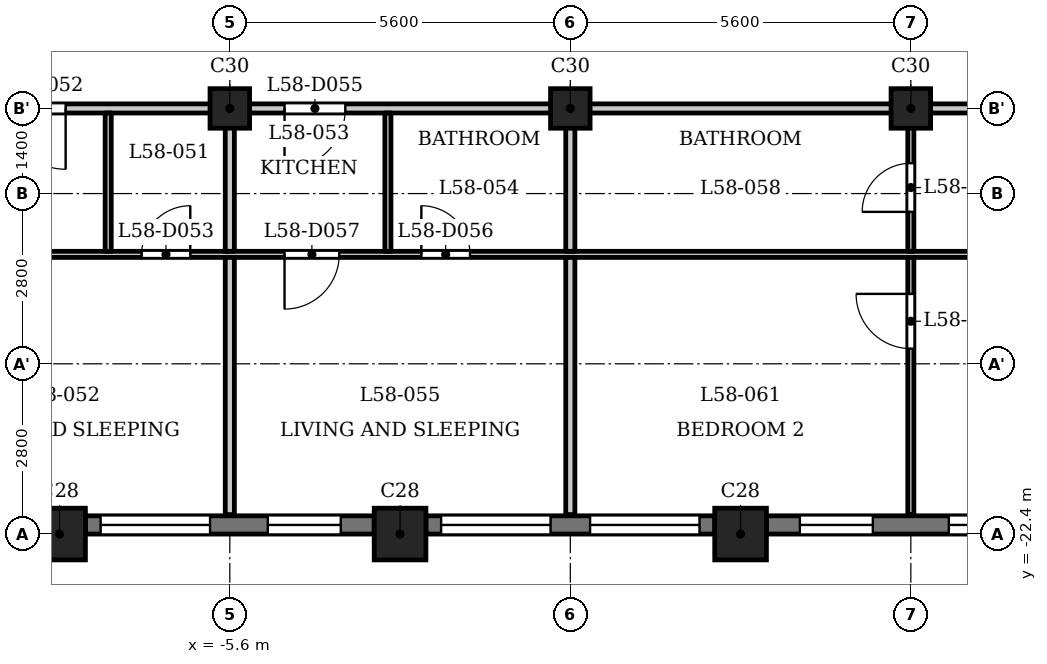
"""IFC4 building model, lengths in metres.
Left out: names, types, materials, properties, quantities, classifications, styles, units other than length and angle.
Written with IfcOpenShell. Run it as: python <this file> out.ifc"""

import sys

from ifc_helpers import new_model, si_unit, direction, frame, frame_2d, origin, origin_2d, place, context, subcontext, project, spatial, rectangle, extrude, element, fill, save


model = new_model("IFC4")
c1 = context("Model", 3, precision=1e-05, world=origin(), true_north=direction((0.0, 1.0)))
c2 = subcontext(c1, "Body", "Model", "MODEL_VIEW")
j1 = project(units=[si_unit("LENGTHUNIT", "METRE"), si_unit("PLANEANGLEUNIT", "RADIAN")], contexts=[c1])
p1 = place(None, origin())
s1 = spatial("IfcSite", under=j1, at=p1, CompositionType="ELEMENT")
p2 = place(p1, origin())
s2 = spatial("IfcBuilding", under=s1, at=p2, CompositionType="ELEMENT")
p3 = place(p2, frame((0.0, 0.0, 223.9)))
s3 = spatial("IfcBuildingStorey", under=s2, at=p3, CompositionType="ELEMENT", Elevation=223.9)
for number, where, z_axis, x_axis in (
    (1, (-8.4, -22.4, 0.0), (0.0, 0.0, 1.0), (1.0, 0.0, 0.0)),
    (2, (-2.8, -22.4, 0.0), (0.0, 0.0, 1.0), (1.0, 0.0, 0.0)),
    (3, (2.8, -22.4, 0.0), (0.0, 0.0, 1.0), (1.0, 0.0, 0.0)),
):
    element("IfcColumn", number, at=place(p3, frame(where, z_axis=z_axis, x_axis=x_axis)), inside=s3, PredefinedType="COLUMN", context=c2, shape_type="SweptSolid", body=[
        extrude(rectangle(XDim=0.85, YDim=0.85, at=origin_2d()), origin(), (0.0, 0.0, 1.0), 3.5),
    ])
for number, where, z_axis, x_axis in (
    (4, (-5.6, -15.4, 0.0), (0.0, 0.0, 1.0), (1.0, 0.0, 0.0)),
    (5, (0.0, -15.4, 0.0), (0.0, 0.0, 1.0), (1.0, 0.0, 0.0)),
    (6, (5.6, -15.4, 0.0), (0.0, 0.0, 1.0), (1.0, 0.0, 0.0)),
):
    element("IfcColumn", number, at=place(p3, frame(where, z_axis=z_axis, x_axis=x_axis)), inside=s3, PredefinedType="COLUMN", context=c2, shape_type="SweptSolid", body=[
        extrude(rectangle(XDim=0.65, YDim=0.65, at=origin_2d()), origin(), (0.0, 0.0, 1.0), 3.5),
    ])
p4 = place(p3, frame((-7.975, -22.25, 0.0), z_axis=(0.0, 0.0, 1.0), x_axis=(1.0, 0.0, 0.0)))
e7 = element("IfcWall", 7, at=p4, inside=s3, PredefinedType="SOLIDWALL", context=c2, shape_type="SweptSolid", body=[
    extrude(rectangle(XDim=4.75, YDim=0.3, at=frame_2d((2.375, 0.0))), origin(), (0.0, 0.0, 1.0), 2.5),
])
p5 = place(p4, frame((0.25, 0.0, 0.9)))
e8 = element("IfcOpeningElement", 8, at=p5, cuts=e7, PredefinedType="OPENING", context=c2, shape_type="SweptSolid", body=[
    extrude(rectangle(XDim=1.8, YDim=1.25, at=frame_2d((0.9, 0.625))), frame((0.0, 0.16, 0.0), z_axis=(0.0, -1.0, 0.0), x_axis=(1.0, 0.0, 0.0)), (0.0, 0.0, 1.0), 0.32),
])
p6 = place(p4, frame((3.0, 0.0, 0.6)))
e9 = element("IfcOpeningElement", 9, at=p6, cuts=e7, PredefinedType="OPENING", context=c2, shape_type="SweptSolid", body=[
    extrude(rectangle(XDim=1.2, YDim=1.55, at=frame_2d((0.6, 0.775))), frame((0.0, 0.16, 0.0), z_axis=(0.0, -1.0, 0.0), x_axis=(1.0, 0.0, 0.0)), (0.0, 0.0, 1.0), 0.32),
])
p7 = place(p3, frame((-2.375, -22.25, 0.0), z_axis=(0.0, 0.0, 1.0), x_axis=(1.0, 0.0, 0.0)))
e10 = element("IfcWall", 10, at=p7, inside=s3, PredefinedType="SOLIDWALL", context=c2, shape_type="SweptSolid", body=[
    extrude(rectangle(XDim=4.75, YDim=0.3, at=frame_2d((2.375, 0.0))), origin(), (0.0, 0.0, 1.0), 2.5),
])
p8 = place(p7, frame((0.25, 0.0, 0.9)))
e11 = element("IfcOpeningElement", 11, at=p8, cuts=e10, PredefinedType="OPENING", context=c2, shape_type="SweptSolid", body=[
    extrude(rectangle(XDim=1.8, YDim=1.25, at=frame_2d((0.9, 0.625))), frame((0.0, 0.16, 0.0), z_axis=(0.0, -1.0, 0.0), x_axis=(1.0, 0.0, 0.0)), (0.0, 0.0, 1.0), 0.32),
])
p9 = place(p7, frame((2.7, 0.0, 0.9)))
e12 = element("IfcOpeningElement", 12, at=p9, cuts=e10, PredefinedType="OPENING", context=c2, shape_type="SweptSolid", body=[
    extrude(rectangle(XDim=1.8, YDim=1.25, at=frame_2d((0.9, 0.625))), frame((0.0, 0.16, 0.0), z_axis=(0.0, -1.0, 0.0), x_axis=(1.0, 0.0, 0.0)), (0.0, 0.0, 1.0), 0.32),
])
p10 = place(p3, frame((3.225, -22.25, 0.0), z_axis=(0.0, 0.0, 1.0), x_axis=(1.0, 0.0, 0.0)))
e13 = element("IfcWall", 13, at=p10, inside=s3, PredefinedType="SOLIDWALL", context=c2, shape_type="SweptSolid", body=[
    extrude(rectangle(XDim=4.75, YDim=0.3, at=frame_2d((2.375, 0.0))), origin(), (0.0, 0.0, 1.0), 2.5),
])
p11 = place(p10, frame((0.55, 0.0, 0.6)))
e14 = element("IfcOpeningElement", 14, at=p11, cuts=e13, PredefinedType="OPENING", context=c2, shape_type="SweptSolid", body=[
    extrude(rectangle(XDim=1.2, YDim=1.55, at=frame_2d((0.6, 0.775))), frame((0.0, 0.16, 0.0), z_axis=(0.0, -1.0, 0.0), x_axis=(1.0, 0.0, 0.0)), (0.0, 0.0, 1.0), 0.32),
])
p12 = place(p10, frame((3.0, 0.0, 0.6)))
e15 = element("IfcOpeningElement", 15, at=p12, cuts=e13, PredefinedType="OPENING", context=c2, shape_type="SweptSolid", body=[
    extrude(rectangle(XDim=1.2, YDim=1.55, at=frame_2d((0.6, 0.775))), frame((0.0, 0.16, 0.0), z_axis=(0.0, -1.0, 0.0), x_axis=(1.0, 0.0, 0.0)), (0.0, 0.0, 1.0), 0.32),
])
p13 = place(p3, frame((-23.594, -17.8, 0.0), z_axis=(0.0, 0.0, 1.0), x_axis=(1.0, 0.0, 0.0)))
e16 = element("IfcWall", 16, at=p13, inside=s3, PredefinedType="PARTITIONING", context=c2, shape_type="SweptSolid", body=[
    extrude(rectangle(XDim=47.188, YDim=0.1, at=frame_2d((23.594, 0.0))), origin(), (0.0, 0.0, 1.0), 3.2),
])
p14 = place(p13, frame((5.094, 0.0, 0.0)))
e17 = element("IfcOpeningElement", 17, at=p14, cuts=e16, PredefinedType="OPENING", context=c2, shape_type="SweptSolid", body=[
    extrude(rectangle(XDim=0.8, YDim=2.1, at=frame_2d((0.4, 1.05))), frame((0.0, 0.06, 0.0), z_axis=(0.0, -1.0, 0.0), x_axis=(1.0, 0.0, 0.0)), (0.0, 0.0, 1.0), 0.12),
])
p15 = place(p13, frame((1.126, 0.0, 0.0)))
e18 = element("IfcOpeningElement", 18, at=p15, cuts=e16, PredefinedType="OPENING", context=c2, shape_type="SweptSolid", body=[
    extrude(rectangle(XDim=0.9, YDim=2.1, at=frame_2d((0.45, 1.05))), frame((0.0, 0.06, 0.0), z_axis=(0.0, -1.0, 0.0), x_axis=(1.0, 0.0, 0.0)), (0.0, 0.0, 1.0), 0.12),
])
p16 = place(p13, frame((9.944, 0.0, 0.0)))
e19 = element("IfcOpeningElement", 19, at=p16, cuts=e16, PredefinedType="OPENING", context=c2, shape_type="SweptSolid", body=[
    extrude(rectangle(XDim=0.8, YDim=2.1, at=frame_2d((0.4, 1.05))), frame((0.0, 0.06, 0.0), z_axis=(0.0, -1.0, 0.0), x_axis=(1.0, 0.0, 0.0)), (0.0, 0.0, 1.0), 0.12),
])
p17 = place(p13, frame((7.444, 0.0, 0.0)))
e20 = element("IfcOpeningElement", 20, at=p17, cuts=e16, PredefinedType="OPENING", context=c2, shape_type="SweptSolid", body=[
    extrude(rectangle(XDim=0.9, YDim=2.1, at=frame_2d((0.45, 1.05))), frame((0.0, 0.06, 0.0), z_axis=(0.0, -1.0, 0.0), x_axis=(1.0, 0.0, 0.0)), (0.0, 0.0, 1.0), 0.12),
])
p18 = place(p13, frame((16.544, 0.0, 0.0)))
e21 = element("IfcOpeningElement", 21, at=p18, cuts=e16, PredefinedType="OPENING", context=c2, shape_type="SweptSolid", body=[
    extrude(rectangle(XDim=0.8, YDim=2.1, at=frame_2d((0.4, 1.05))), frame((0.0, 0.06, 0.0), z_axis=(0.0, -1.0, 0.0), x_axis=(1.0, 0.0, 0.0)), (0.0, 0.0, 1.0), 0.12),
])
p19 = place(p13, frame((13.294, 0.0, 0.0)))
e22 = element("IfcOpeningElement", 22, at=p19, cuts=e16, PredefinedType="OPENING", context=c2, shape_type="SweptSolid", body=[
    extrude(rectangle(XDim=0.9, YDim=2.1, at=frame_2d((0.45, 1.05))), frame((0.0, 0.06, 0.0), z_axis=(0.0, -1.0, 0.0), x_axis=(1.0, 0.0, 0.0)), (0.0, 0.0, 1.0), 0.12),
])
p20 = place(p13, frame((21.144, 0.0, 0.0)))
e23 = element("IfcOpeningElement", 23, at=p20, cuts=e16, PredefinedType="OPENING", context=c2, shape_type="SweptSolid", body=[
    extrude(rectangle(XDim=0.8, YDim=2.1, at=frame_2d((0.4, 1.05))), frame((0.0, 0.06, 0.0), z_axis=(0.0, -1.0, 0.0), x_axis=(1.0, 0.0, 0.0)), (0.0, 0.0, 1.0), 0.12),
])
p21 = place(p13, frame((18.894, 0.0, 0.0)))
e24 = element("IfcOpeningElement", 24, at=p21, cuts=e16, PredefinedType="OPENING", context=c2, shape_type="SweptSolid", body=[
    extrude(rectangle(XDim=0.9, YDim=2.1, at=frame_2d((0.45, 1.05))), frame((0.0, 0.06, 0.0), z_axis=(0.0, -1.0, 0.0), x_axis=(1.0, 0.0, 0.0)), (0.0, 0.0, 1.0), 0.12),
])
p22 = place(p13, frame((35.944, 0.0, 0.0)))
e25 = element("IfcOpeningElement", 25, at=p22, cuts=e16, PredefinedType="OPENING", context=c2, shape_type="SweptSolid", body=[
    extrude(rectangle(XDim=0.9, YDim=2.1, at=frame_2d((0.45, 1.05))), frame((0.0, 0.06, 0.0), z_axis=(0.0, -1.0, 0.0), x_axis=(1.0, 0.0, 0.0)), (0.0, 0.0, 1.0), 0.12),
])
p23 = place(p13, frame((32.594, 0.0, 0.0)))
e26 = element("IfcOpeningElement", 26, at=p23, cuts=e16, PredefinedType="OPENING", context=c2, shape_type="SweptSolid", body=[
    extrude(rectangle(XDim=0.9, YDim=2.1, at=frame_2d((0.45, 1.05))), frame((0.0, 0.06, 0.0), z_axis=(0.0, -1.0, 0.0), x_axis=(1.0, 0.0, 0.0)), (0.0, 0.0, 1.0), 0.12),
])
p24 = place(p13, frame((40.944, 0.0, 0.0)))
e27 = element("IfcOpeningElement", 27, at=p24, cuts=e16, PredefinedType="OPENING", context=c2, shape_type="SweptSolid", body=[
    extrude(rectangle(XDim=0.8, YDim=2.1, at=frame_2d((0.4, 1.05))), frame((0.0, 0.06, 0.0), z_axis=(0.0, -1.0, 0.0), x_axis=(1.0, 0.0, 0.0)), (0.0, 0.0, 1.0), 0.12),
])
p25 = place(p13, frame((45.444, 0.0, 0.0)))
e28 = element("IfcOpeningElement", 28, at=p25, cuts=e16, PredefinedType="OPENING", context=c2, shape_type="SweptSolid", body=[
    extrude(rectangle(XDim=0.9, YDim=2.1, at=frame_2d((0.45, 1.05))), frame((0.0, 0.06, 0.0), z_axis=(0.0, -1.0, 0.0), x_axis=(1.0, 0.0, 0.0)), (0.0, 0.0, 1.0), 0.12),
])
p26 = place(p3, frame((-24.684, -15.4, 0.0), z_axis=(0.0, 0.0, 1.0), x_axis=(1.0, 0.0, 0.0)))
e29 = element("IfcWall", 29, at=p26, inside=s3, PredefinedType="PARTITIONING", context=c2, shape_type="SweptSolid", body=[
    extrude(rectangle(XDim=49.368, YDim=0.15, at=frame_2d((24.684, 0.0))), origin(), (0.0, 0.0, 1.0), 3.2),
])
p27 = place(p26, frame((1.143, 0.0, 0.0)))
e30 = element("IfcOpeningElement", 30, at=p27, cuts=e29, PredefinedType="OPENING", context=c2, shape_type="SweptSolid", body=[
    extrude(rectangle(XDim=1.0, YDim=2.1, at=frame_2d((0.5, 1.05))), frame((0.0, 0.085, 0.0), z_axis=(0.0, -1.0, 0.0), x_axis=(1.0, 0.0, 0.0)), (0.0, 0.0, 1.0), 0.17),
])
p28 = place(p26, frame((8.534, 0.0, 0.0)))
e31 = element("IfcOpeningElement", 31, at=p28, cuts=e29, PredefinedType="OPENING", context=c2, shape_type="SweptSolid", body=[
    extrude(rectangle(XDim=1.0, YDim=2.1, at=frame_2d((0.5, 1.05))), frame((0.0, 0.085, 0.0), z_axis=(0.0, -1.0, 0.0), x_axis=(1.0, 0.0, 0.0)), (0.0, 0.0, 1.0), 0.17),
])
p29 = place(p26, frame((15.384, 0.0, 0.0)))
e32 = element("IfcOpeningElement", 32, at=p29, cuts=e29, PredefinedType="OPENING", context=c2, shape_type="SweptSolid", body=[
    extrude(rectangle(XDim=1.0, YDim=2.1, at=frame_2d((0.5, 1.05))), frame((0.0, 0.085, 0.0), z_axis=(0.0, -1.0, 0.0), x_axis=(1.0, 0.0, 0.0)), (0.0, 0.0, 1.0), 0.17),
])
p30 = place(p26, frame((19.984, 0.0, 0.0)))
e33 = element("IfcOpeningElement", 33, at=p30, cuts=e29, PredefinedType="OPENING", context=c2, shape_type="SweptSolid", body=[
    extrude(rectangle(XDim=1.0, YDim=2.1, at=frame_2d((0.5, 1.05))), frame((0.0, 0.085, 0.0), z_axis=(0.0, -1.0, 0.0), x_axis=(1.0, 0.0, 0.0)), (0.0, 0.0, 1.0), 0.17),
])
p31 = place(p26, frame((39.784, 0.0, 0.0)))
e34 = element("IfcOpeningElement", 34, at=p31, cuts=e29, PredefinedType="OPENING", context=c2, shape_type="SweptSolid", body=[
    extrude(rectangle(XDim=1.0, YDim=2.1, at=frame_2d((0.5, 1.05))), frame((0.0, 0.085, 0.0), z_axis=(0.0, -1.0, 0.0), x_axis=(1.0, 0.0, 0.0)), (0.0, 0.0, 1.0), 0.17),
])
p32 = place(p26, frame((47.384, 0.0, 0.0)))
e35 = element("IfcOpeningElement", 35, at=p32, cuts=e29, PredefinedType="OPENING", context=c2, shape_type="SweptSolid", body=[
    extrude(rectangle(XDim=1.0, YDim=2.1, at=frame_2d((0.5, 1.05))), frame((0.0, 0.085, 0.0), z_axis=(0.0, -1.0, 0.0), x_axis=(1.0, 0.0, 0.0)), (0.0, 0.0, 1.0), 0.17),
])
p33 = place(p3, frame((-7.6, -17.75, 0.0), z_axis=(0.0, 0.0, 1.0), x_axis=(0.0, 1.0, 0.0)))
e36 = element("IfcWall", 36, at=p33, inside=s3, PredefinedType="PARTITIONING", context=c2, shape_type="SweptSolid", body=[
    extrude(rectangle(XDim=2.275, YDim=0.1, at=frame_2d((1.137, 0.0))), origin(), (0.0, 0.0, 1.0), 3.2),
])
p34 = place(p3, frame((-5.6, -22.08, 0.0), z_axis=(0.0, 0.0, 1.0), x_axis=(0.0, 1.0, 0.0)))
e37 = element("IfcWall", 37, at=p34, inside=s3, PredefinedType="PARTITIONING", context=c2, shape_type="SweptSolid", body=[
    extrude(rectangle(XDim=4.23, YDim=0.15, at=frame_2d((2.115, 0.0))), origin(), (0.0, 0.0, 1.0), 3.2),
])
p35 = place(p3, frame((-5.6, -17.75, 0.0), z_axis=(0.0, 0.0, 1.0), x_axis=(0.0, 1.0, 0.0)))
e38 = element("IfcWall", 38, at=p35, inside=s3, PredefinedType="PARTITIONING", context=c2, shape_type="SweptSolid", body=[
    extrude(rectangle(XDim=2.275, YDim=0.15, at=frame_2d((1.137, 0.0))), origin(), (0.0, 0.0, 1.0), 3.2),
])
p36 = place(p3, frame((-3.0, -17.75, 0.0), z_axis=(0.0, 0.0, 1.0), x_axis=(0.0, 1.0, 0.0)))
e39 = element("IfcWall", 39, at=p36, inside=s3, PredefinedType="PARTITIONING", context=c2, shape_type="SweptSolid", body=[
    extrude(rectangle(XDim=2.275, YDim=0.1, at=frame_2d((1.137, 0.0))), origin(), (0.0, 0.0, 1.0), 3.2),
])
p37 = place(p3, frame((0.0, -22.08, 0.0), z_axis=(0.0, 0.0, 1.0), x_axis=(0.0, 1.0, 0.0)))
e40 = element("IfcWall", 40, at=p37, inside=s3, PredefinedType="PARTITIONING", context=c2, shape_type="SweptSolid", body=[
    extrude(rectangle(XDim=4.23, YDim=0.15, at=frame_2d((2.115, 0.0))), origin(), (0.0, 0.0, 1.0), 3.2),
])
p38 = place(p3, frame((0.0, -17.75, 0.0), z_axis=(0.0, 0.0, 1.0), x_axis=(0.0, 1.0, 0.0)))
e41 = element("IfcWall", 41, at=p38, inside=s3, PredefinedType="PARTITIONING", context=c2, shape_type="SweptSolid", body=[
    extrude(rectangle(XDim=2.275, YDim=0.15, at=frame_2d((1.137, 0.0))), origin(), (0.0, 0.0, 1.0), 3.2),
])
p39 = place(p3, frame((5.6, -22.08, 0.0), z_axis=(0.0, 0.0, 1.0), x_axis=(0.0, 1.0, 0.0)))
e42 = element("IfcWall", 42, at=p39, inside=s3, PredefinedType="PARTITIONING", context=c2, shape_type="SweptSolid", body=[
    extrude(rectangle(XDim=4.23, YDim=0.1, at=frame_2d((2.115, 0.0))), origin(), (0.0, 0.0, 1.0), 3.2),
])
p40 = place(p39, frame((2.73, 0.0, 0.0)))
e43 = element("IfcOpeningElement", 43, at=p40, cuts=e42, PredefinedType="OPENING", context=c2, shape_type="SweptSolid", body=[
    extrude(rectangle(XDim=0.9, YDim=2.1, at=frame_2d((0.45, 1.05))), frame((0.0, 0.06, 0.0), z_axis=(0.0, -1.0, 0.0), x_axis=(1.0, 0.0, 0.0)), (0.0, 0.0, 1.0), 0.12),
])
p41 = place(p3, frame((5.6, -17.75, 0.0), z_axis=(0.0, 0.0, 1.0), x_axis=(0.0, 1.0, 0.0)))
e44 = element("IfcWall", 44, at=p41, inside=s3, PredefinedType="PARTITIONING", context=c2, shape_type="SweptSolid", body=[
    extrude(rectangle(XDim=2.275, YDim=0.1, at=frame_2d((1.137, 0.0))), origin(), (0.0, 0.0, 1.0), 3.2),
])
p42 = place(p41, frame((0.649, 0.0, 0.0)))
e45 = element("IfcOpeningElement", 45, at=p42, cuts=e44, PredefinedType="OPENING", context=c2, shape_type="SweptSolid", body=[
    extrude(rectangle(XDim=0.8, YDim=2.1, at=frame_2d((0.4, 1.05))), frame((0.0, 0.06, 0.0), z_axis=(0.0, -1.0, 0.0), x_axis=(1.0, 0.0, 0.0)), (0.0, 0.0, 1.0), 0.12),
])
p43 = place(p29, origin())
e46 = element("IfcDoor", 46, at=p43, inside=s3, OperationType="SINGLE_SWING_RIGHT", PredefinedType="DOOR", context=c2, shape_type="SweptSolid", body=[
    extrude(rectangle(XDim=1.0, YDim=2.1, at=frame_2d((0.5, 1.05))), frame((0.0, 0.025, 0.0), z_axis=(0.0, -1.0, 0.0), x_axis=(1.0, 0.0, 0.0)), (0.0, 0.0, 1.0), 0.05),
])
fill(e32, e46)
p44 = place(p18, origin())
e47 = element("IfcDoor", 47, at=p44, inside=s3, OperationType="SINGLE_SWING_LEFT", PredefinedType="DOOR", context=c2, shape_type="SweptSolid", body=[
    extrude(rectangle(XDim=0.8, YDim=2.1, at=frame_2d((0.4, 1.05))), frame((0.0, 0.025, 0.0), z_axis=(0.0, -1.0, 0.0), x_axis=(1.0, 0.0, 0.0)), (0.0, 0.0, 1.0), 0.05),
])
fill(e21, e47)
p45 = place(p30, origin())
e48 = element("IfcDoor", 48, at=p45, inside=s3, OperationType="SINGLE_SWING_LEFT", PredefinedType="DOOR", context=c2, shape_type="SweptSolid", body=[
    extrude(rectangle(XDim=1.0, YDim=2.1, at=frame_2d((0.5, 1.05))), frame((0.0, 0.025, 0.0), z_axis=(0.0, -1.0, 0.0), x_axis=(1.0, 0.0, 0.0)), (0.0, 0.0, 1.0), 0.05),
])
fill(e33, e48)
p46 = place(p20, origin())
e49 = element("IfcDoor", 49, at=p46, inside=s3, OperationType="SINGLE_SWING_RIGHT", PredefinedType="DOOR", context=c2, shape_type="SweptSolid", body=[
    extrude(rectangle(XDim=0.8, YDim=2.1, at=frame_2d((0.4, 1.05))), frame((0.0, 0.025, 0.0), z_axis=(0.0, -1.0, 0.0), x_axis=(1.0, 0.0, 0.0)), (0.0, 0.0, 1.0), 0.05),
])
fill(e23, e49)
p47 = place(p21, origin())
e50 = element("IfcDoor", 50, at=p47, inside=s3, OperationType="SINGLE_SWING_LEFT", PredefinedType="DOOR", context=c2, shape_type="SweptSolid", body=[
    extrude(rectangle(XDim=0.9, YDim=2.1, at=frame_2d((0.45, 1.05))), frame((0.0, 0.025, 0.0), z_axis=(0.0, -1.0, 0.0), x_axis=(1.0, 0.0, 0.0)), (0.0, 0.0, 1.0), 0.05),
])
fill(e24, e50)
p48 = place(p42, origin())
e51 = element("IfcDoor", 51, at=p48, inside=s3, OperationType="SINGLE_SWING_RIGHT", PredefinedType="DOOR", context=c2, shape_type="SweptSolid", body=[
    extrude(rectangle(XDim=0.8, YDim=2.1, at=frame_2d((0.4, 1.05))), frame((0.0, 0.025, 0.0), z_axis=(0.0, -1.0, 0.0), x_axis=(1.0, 0.0, 0.0)), (0.0, 0.0, 1.0), 0.05),
])
fill(e45, e51)
p49 = place(p40, origin())
e52 = element("IfcDoor", 52, at=p49, inside=s3, OperationType="SINGLE_SWING_LEFT", PredefinedType="DOOR", context=c2, shape_type="SweptSolid", body=[
    extrude(rectangle(XDim=0.9, YDim=2.1, at=frame_2d((0.45, 1.05))), frame((0.0, 0.025, 0.0), z_axis=(0.0, -1.0, 0.0), x_axis=(1.0, 0.0, 0.0)), (0.0, 0.0, 1.0), 0.05),
])
fill(e43, e52)
p50 = place(p5, origin())
e53 = element("IfcWindow", 53, at=p50, inside=s3, PartitioningType="SINGLE_PANEL", PredefinedType="WINDOW", context=c2, shape_type="SweptSolid", body=[
    extrude(rectangle(XDim=1.8, YDim=1.25, at=frame_2d((0.9, 0.625))), frame((0.0, 0.03, 0.0), z_axis=(0.0, -1.0, 0.0), x_axis=(1.0, 0.0, 0.0)), (0.0, 0.0, 1.0), 0.06),
])
fill(e8, e53)
p51 = place(p6, origin())
e54 = element("IfcWindow", 54, at=p51, inside=s3, PartitioningType="SINGLE_PANEL", PredefinedType="WINDOW", context=c2, shape_type="SweptSolid", body=[
    extrude(rectangle(XDim=1.2, YDim=1.55, at=frame_2d((0.6, 0.775))), frame((0.0, 0.03, 0.0), z_axis=(0.0, -1.0, 0.0), x_axis=(1.0, 0.0, 0.0)), (0.0, 0.0, 1.0), 0.06),
])
fill(e9, e54)
p52 = place(p8, origin())
e55 = element("IfcWindow", 55, at=p52, inside=s3, PartitioningType="SINGLE_PANEL", PredefinedType="WINDOW", context=c2, shape_type="SweptSolid", body=[
    extrude(rectangle(XDim=1.8, YDim=1.25, at=frame_2d((0.9, 0.625))), frame((0.0, 0.03, 0.0), z_axis=(0.0, -1.0, 0.0), x_axis=(1.0, 0.0, 0.0)), (0.0, 0.0, 1.0), 0.06),
])
fill(e11, e55)
p53 = place(p9, origin())
e56 = element("IfcWindow", 56, at=p53, inside=s3, PartitioningType="SINGLE_PANEL", PredefinedType="WINDOW", context=c2, shape_type="SweptSolid", body=[
    extrude(rectangle(XDim=1.8, YDim=1.25, at=frame_2d((0.9, 0.625))), frame((0.0, 0.03, 0.0), z_axis=(0.0, -1.0, 0.0), x_axis=(1.0, 0.0, 0.0)), (0.0, 0.0, 1.0), 0.06),
])
fill(e12, e56)
p54 = place(p11, origin())
e57 = element("IfcWindow", 57, at=p54, inside=s3, PartitioningType="SINGLE_PANEL", PredefinedType="WINDOW", context=c2, shape_type="SweptSolid", body=[
    extrude(rectangle(XDim=1.2, YDim=1.55, at=frame_2d((0.6, 0.775))), frame((0.0, 0.03, 0.0), z_axis=(0.0, -1.0, 0.0), x_axis=(1.0, 0.0, 0.0)), (0.0, 0.0, 1.0), 0.06),
])
fill(e14, e57)
p55 = place(p12, origin())
e58 = element("IfcWindow", 58, at=p55, inside=s3, PartitioningType="SINGLE_PANEL", PredefinedType="WINDOW", context=c2, shape_type="SweptSolid", body=[
    extrude(rectangle(XDim=1.2, YDim=1.55, at=frame_2d((0.6, 0.775))), frame((0.0, 0.03, 0.0), z_axis=(0.0, -1.0, 0.0), x_axis=(1.0, 0.0, 0.0)), (0.0, 0.0, 1.0), 0.06),
])
fill(e15, e58)
save(model, sys.argv[1])
